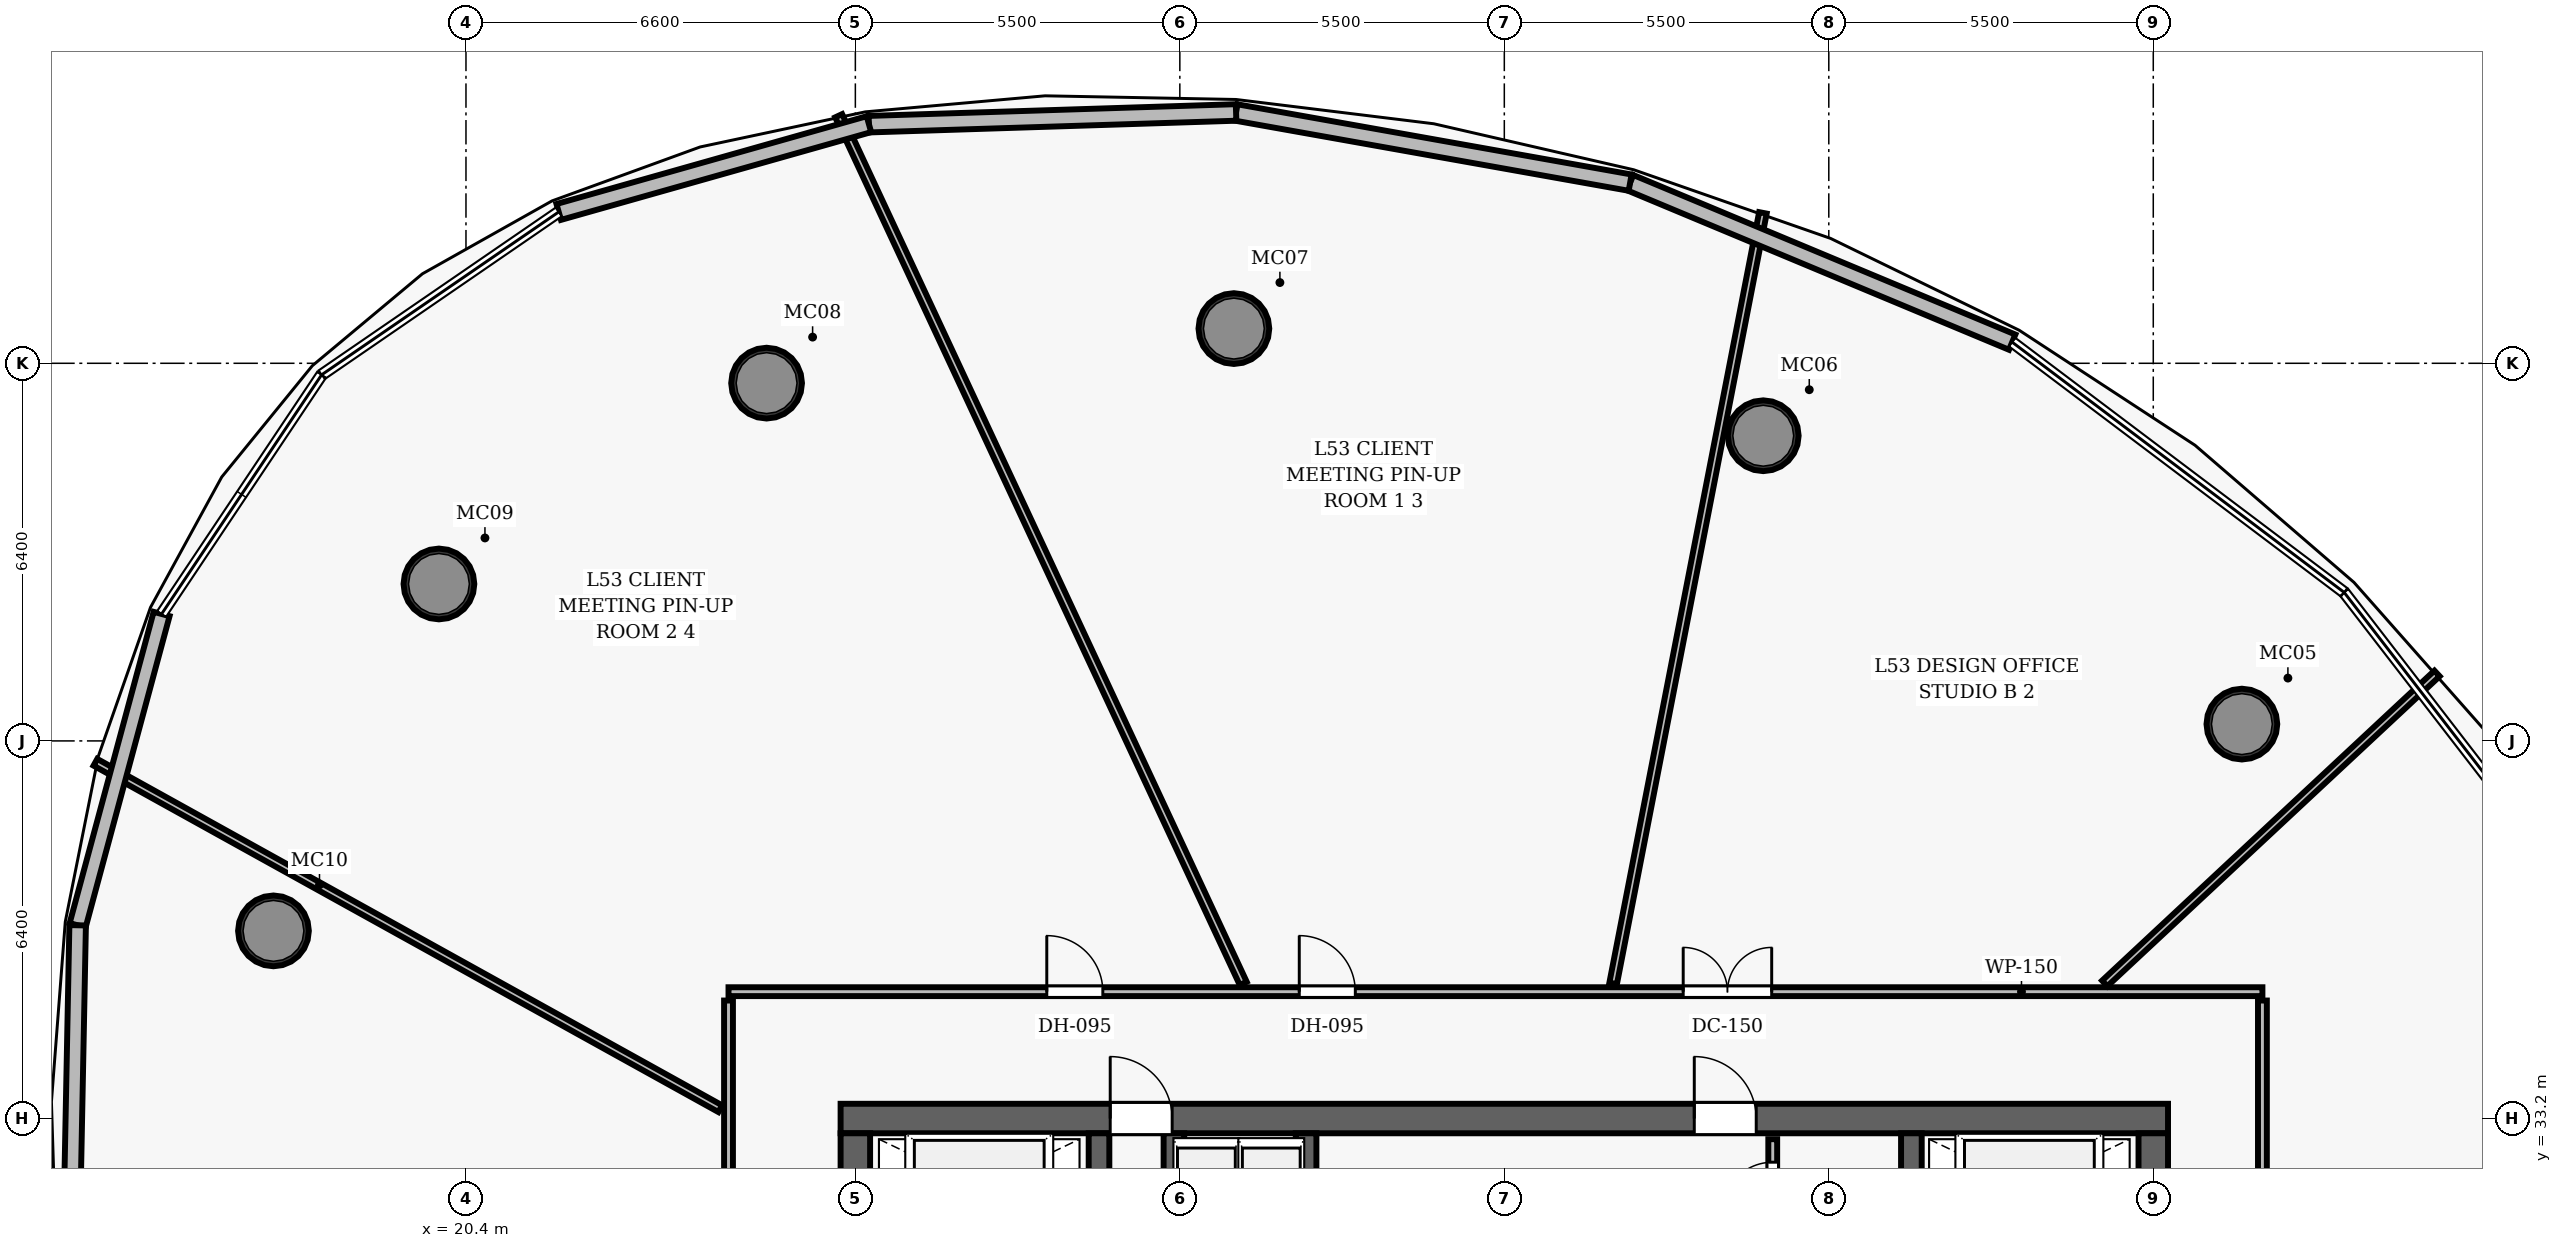
"""IFC4 building model, lengths in metres.
Left out: names, types, materials, properties, quantities, classifications, styles, units other than length and angle.
Written with IfcOpenShell. Run it as: python <this file> out.ifc"""

import sys

from ifc_helpers import new_model, si_unit, direction, frame, frame_2d, origin, origin_2d, place, context, subcontext, project, spatial, rectangle, hollow_circle, extrude, element, fill, save


model = new_model("IFC4")
c1 = context("Model", 3, precision=1e-05, world=origin(), true_north=direction((0.0, 1.0)))
c2 = subcontext(c1, "Body", "Model", "MODEL_VIEW")
j1 = project(units=[si_unit("LENGTHUNIT", "METRE"), si_unit("PLANEANGLEUNIT", "RADIAN")], contexts=[c1])
p1 = place(None, origin())
s1 = spatial("IfcSite", under=j1, at=p1, CompositionType="ELEMENT")
p2 = place(p1, origin())
s2 = spatial("IfcBuilding", under=s1, at=p2, CompositionType="ELEMENT")
p3 = place(p2, frame((0.0, 0.0, 209.7)))
s3 = spatial("IfcBuildingStorey", under=s2, at=p3, CompositionType="ELEMENT", Elevation=209.7)
p4 = place(p3, frame((26.75, 33.2, 0.0), z_axis=(0.0, 0.0, 1.0), x_axis=(1.0, 0.0, 0.0)))
e1 = element("IfcWall", 1, at=p4, inside=s3, PredefinedType="SHEAR", context=c2, shape_type="SweptSolid", body=[
    extrude(rectangle(XDim=22.5, YDim=0.5, at=frame_2d((11.25, 0.0))), origin(), (0.0, 0.0, 1.0), 3.85),
])
p5 = place(p4, frame((4.57, 0.0, 0.0)))
e2 = element("IfcOpeningElement", 2, at=p5, cuts=e1, PredefinedType="OPENING", context=c2, shape_type="SweptSolid", body=[
    extrude(rectangle(XDim=1.05, YDim=2.15, at=frame_2d((0.525, 1.075))), frame((0.0, 0.26, 0.0), z_axis=(0.0, -1.0, 0.0), x_axis=(1.0, 0.0, 0.0)), (0.0, 0.0, 1.0), 0.52),
])
p6 = place(p4, frame((14.47, 0.0, 0.0)))
e3 = element("IfcOpeningElement", 3, at=p6, cuts=e1, PredefinedType="OPENING", context=c2, shape_type="SweptSolid", body=[
    extrude(rectangle(XDim=1.05, YDim=2.15, at=frame_2d((0.525, 1.075))), frame((0.0, 0.26, 0.0), z_axis=(0.0, -1.0, 0.0), x_axis=(1.0, 0.0, 0.0)), (0.0, 0.0, 1.0), 0.52),
])
p7 = place(p3, frame((27.0, 19.05, 0.0), z_axis=(0.0, 0.0, 1.0), x_axis=(0.0, 1.0, 0.0)))
e4 = element("IfcWall", 4, at=p7, inside=s3, PredefinedType="SHEAR", context=c2, shape_type="SweptSolid", body=[
    extrude(rectangle(XDim=13.9, YDim=0.5, at=frame_2d((6.95, 0.0))), origin(), (0.0, 0.0, 1.0), 3.85),
])
p8 = place(p7, frame((8.2, 0.0, 0.0)))
e5 = element("IfcOpeningElement", 5, at=p8, cuts=e4, PredefinedType="OPENING", context=c2, shape_type="SweptSolid", body=[
    extrude(rectangle(XDim=1.05, YDim=2.15, at=frame_2d((0.525, 1.075))), frame((0.0, 0.26, 0.0), z_axis=(0.0, -1.0, 0.0), x_axis=(1.0, 0.0, 0.0)), (0.0, 0.0, 1.0), 0.52),
])
p9 = place(p3, frame((49.0, 19.05, 0.0), z_axis=(0.0, 0.0, 1.0), x_axis=(0.0, 1.0, 0.0)))
e6 = element("IfcWall", 6, at=p9, inside=s3, PredefinedType="SHEAR", context=c2, shape_type="SweptSolid", body=[
    extrude(rectangle(XDim=13.9, YDim=0.5, at=frame_2d((6.95, 0.0))), origin(), (0.0, 0.0, 1.0), 3.85),
])
p10 = place(p9, frame((8.2, 0.0, 0.0)))
e7 = element("IfcOpeningElement", 7, at=p10, cuts=e6, PredefinedType="OPENING", context=c2, shape_type="SweptSolid", body=[
    extrude(rectangle(XDim=1.05, YDim=2.15, at=frame_2d((0.525, 1.075))), frame((0.0, 0.26, 0.0), z_axis=(0.0, -1.0, 0.0), x_axis=(1.0, 0.0, 0.0)), (0.0, 0.0, 1.0), 0.52),
])
for number, where, z_axis, x_axis in (
    (8, (31.13, 19.05, 0.0), (0.0, 0.0, 1.0), (0.0, 1.0, 0.0)),
    (9, (44.9, 19.05, 0.0), (0.0, 0.0, 1.0), (0.0, 1.0, 0.0)),
):
    element("IfcWall", number, at=place(p3, frame(where, z_axis=z_axis, x_axis=x_axis)), inside=s3, PredefinedType="SHEAR", context=c2, shape_type="SweptSolid", body=[
        extrude(rectangle(XDim=13.9, YDim=0.35, at=frame_2d((6.95, 0.0))), origin(), (0.0, 0.0, 1.0), 3.85),
    ])
for number, where, z_axis, x_axis in (
    (10, (50.502, 39.885, 0.0), (0.0, 0.0, 1.0), (1.0, 0.0, 0.0)),
    (11, (42.389, 44.772, 0.0), (0.0, 0.0, 1.0), (1.0, 0.0, 0.0)),
    (12, (33.416, 46.588, 0.0), (0.0, 0.0, 1.0), (1.0, 0.0, 0.0)),
    (13, (25.496, 45.664, 0.0), (0.0, 0.0, 1.0), (1.0, 0.0, 0.0)),
    (14, (19.942, 42.26, 0.0), (0.0, 0.0, 1.0), (1.0, 0.0, 0.0)),
    (15, (17.137, 36.381, 0.0), (0.0, 0.0, 1.0), (1.0, 0.0, 0.0)),
):
    element("IfcColumn", number, at=place(p3, frame(where, z_axis=z_axis, x_axis=x_axis)), inside=s3, PredefinedType="COLUMN", context=c2, shape_type="SweptSolid", body=[
        extrude(hollow_circle(Radius=0.6, WallThickness=0.05, at=origin_2d()), origin(), (0.0, 0.0, 1.0), 3.85),
    ])
p11 = place(p3, frame((34.64, 26.69, 0.0), z_axis=(0.0, 0.0, 1.0), x_axis=(0.0, 1.0, 0.0)))
e16 = element("IfcWall", 16, at=p11, inside=s3, PredefinedType="SHEAR", context=c2, shape_type="SweptSolid", body=[
    extrude(rectangle(XDim=6.26, YDim=0.35, at=frame_2d((3.13, 0.0))), origin(), (0.0, 0.0, 1.0), 3.85),
])
p12 = place(p3, frame((32.4, 30.22, 0.0), z_axis=(0.0, 0.0, 1.0), x_axis=(0.0, 1.0, 0.0)))
e17 = element("IfcWall", 17, at=p12, inside=s3, PredefinedType="SHEAR", context=c2, shape_type="SweptSolid", body=[
    extrude(rectangle(XDim=2.73, YDim=0.35, at=frame_2d((1.365, 0.0))), origin(), (0.0, 0.0, 1.0), 3.035),
])
p13 = place(p3, frame((42.55, 28.1, 0.0), z_axis=(0.0, 0.0, 1.0), x_axis=(0.0, 1.0, 0.0)))
e18 = element("IfcWall", 18, at=p13, inside=s3, PredefinedType="PARTITIONING", context=c2, shape_type="SweptSolid", body=[
    extrude(rectangle(XDim=4.75, YDim=0.15, at=frame_2d((2.375, 0.0))), origin(), (0.0, 0.0, 1.0), 3.035),
])
p14 = place(p13, frame((0.35, 0.0, 0.0)))
e19 = element("IfcOpeningElement", 19, at=p14, cuts=e18, PredefinedType="OPENING", context=c2, shape_type="SweptSolid", body=[
    extrude(rectangle(XDim=0.85, YDim=2.1, at=frame_2d((0.425, 1.05))), frame((0.0, 0.085, 0.0), z_axis=(0.0, -1.0, 0.0), x_axis=(1.0, 0.0, 0.0)), (0.0, 0.0, 1.0), 0.17),
])
p15 = place(p13, frame((1.93, 0.0, 0.0)))
e20 = element("IfcOpeningElement", 20, at=p15, cuts=e18, PredefinedType="OPENING", context=c2, shape_type="SweptSolid", body=[
    extrude(rectangle(XDim=0.85, YDim=2.1, at=frame_2d((0.425, 1.05))), frame((0.0, 0.085, 0.0), z_axis=(0.0, -1.0, 0.0), x_axis=(1.0, 0.0, 0.0)), (0.0, 0.0, 1.0), 0.17),
])
p16 = place(p13, frame((3.51, 0.0, 0.0)))
e21 = element("IfcOpeningElement", 21, at=p16, cuts=e18, PredefinedType="OPENING", context=c2, shape_type="SweptSolid", body=[
    extrude(rectangle(XDim=0.85, YDim=2.1, at=frame_2d((0.425, 1.05))), frame((0.0, 0.085, 0.0), z_axis=(0.0, -1.0, 0.0), x_axis=(1.0, 0.0, 0.0)), (0.0, 0.0, 1.0), 0.17),
])
p17 = place(p3, frame((24.85, 35.35, 0.0), z_axis=(0.0, 0.0, 1.0), x_axis=(1.0, 0.0, 0.0)))
e22 = element("IfcWall", 22, at=p17, inside=s3, PredefinedType="PARTITIONING", context=c2, shape_type="SweptSolid", body=[
    extrude(rectangle(XDim=26.0, YDim=0.15, at=frame_2d((13.0, 0.0))), origin(), (0.0, 0.0, 1.0), 3.035),
])
p18 = place(p17, frame((16.182, 0.0, 0.0)))
e23 = element("IfcOpeningElement", 23, at=p18, cuts=e22, PredefinedType="OPENING", context=c2, shape_type="SweptSolid", body=[
    extrude(rectangle(XDim=1.5, YDim=2.2, at=frame_2d((0.75, 1.1))), frame((0.0, 0.085, 0.0), z_axis=(0.0, -1.0, 0.0), x_axis=(1.0, 0.0, 0.0)), (0.0, 0.0, 1.0), 0.17),
])
p19 = place(p17, frame((9.675, 0.0, 0.0)))
e24 = element("IfcOpeningElement", 24, at=p19, cuts=e22, PredefinedType="OPENING", context=c2, shape_type="SweptSolid", body=[
    extrude(rectangle(XDim=0.95, YDim=2.15, at=frame_2d((0.475, 1.075))), frame((0.0, 0.085, 0.0), z_axis=(0.0, -1.0, 0.0), x_axis=(1.0, 0.0, 0.0)), (0.0, 0.0, 1.0), 0.17),
])
p20 = place(p17, frame((5.395, 0.0, 0.0)))
e25 = element("IfcOpeningElement", 25, at=p20, cuts=e22, PredefinedType="OPENING", context=c2, shape_type="SweptSolid", body=[
    extrude(rectangle(XDim=0.95, YDim=2.15, at=frame_2d((0.475, 1.075))), frame((0.0, 0.085, 0.0), z_axis=(0.0, -1.0, 0.0), x_axis=(1.0, 0.0, 0.0)), (0.0, 0.0, 1.0), 0.17),
])
p21 = place(p3, frame((24.85, 27.08, 0.0), z_axis=(0.0, 0.0, 1.0), x_axis=(0.0, 1.0, 0.0)))
e26 = element("IfcWall", 26, at=p21, inside=s3, PredefinedType="PARTITIONING", context=c2, shape_type="SweptSolid", body=[
    extrude(rectangle(XDim=8.12, YDim=0.15, at=frame_2d((4.06, 0.0))), origin(), (0.0, 0.0, 1.0), 3.035),
])
p22 = place(p21, frame((1.169, 0.0, 0.0)))
e27 = element("IfcOpeningElement", 27, at=p22, cuts=e26, PredefinedType="OPENING", context=c2, shape_type="SweptSolid", body=[
    extrude(rectangle(XDim=0.95, YDim=2.15, at=frame_2d((0.475, 1.075))), frame((0.0, 0.085, 0.0), z_axis=(0.0, -1.0, 0.0), x_axis=(1.0, 0.0, 0.0)), (0.0, 0.0, 1.0), 0.17),
])
p23 = place(p3, frame((50.85, 27.08, 0.0), z_axis=(0.0, 0.0, 1.0), x_axis=(0.0, 1.0, 0.0)))
e28 = element("IfcWall", 28, at=p23, inside=s3, PredefinedType="PARTITIONING", context=c2, shape_type="SweptSolid", body=[
    extrude(rectangle(XDim=8.12, YDim=0.15, at=frame_2d((4.06, 0.0))), origin(), (0.0, 0.0, 1.0), 3.035),
])
p24 = place(p23, frame((1.442, 0.0, 0.0)))
e29 = element("IfcOpeningElement", 29, at=p24, cuts=e28, PredefinedType="OPENING", context=c2, shape_type="SweptSolid", body=[
    extrude(rectangle(XDim=1.5, YDim=2.2, at=frame_2d((0.75, 1.1))), frame((0.0, 0.085, 0.0), z_axis=(0.0, -1.0, 0.0), x_axis=(1.0, 0.0, 0.0)), (0.0, 0.0, 1.0), 0.17),
])
p25 = place(p3, frame((48.177, 35.49, 0.0), z_axis=(0.0, 0.0, 1.0), x_axis=(0.731351379183, 0.682000850562, 0.0)))
e30 = element("IfcWall", 30, at=p25, inside=s3, PredefinedType="PARTITIONING", context=c2, shape_type="SweptSolid", body=[
    extrude(rectangle(XDim=7.703, YDim=0.13, at=frame_2d((3.851, 0.0))), origin(), (0.0, 0.0, 1.0), 3.035),
])
p26 = place(p3, frame((39.845, 35.49, 0.0), z_axis=(0.0, 0.0, 1.0), x_axis=(0.190812682299, 0.981626466775, 0.0)))
e31 = element("IfcWall", 31, at=p26, inside=s3, PredefinedType="PARTITIONING", context=c2, shape_type="SweptSolid", body=[
    extrude(rectangle(XDim=13.304, YDim=0.13, at=frame_2d((6.652, 0.0))), origin(), (0.0, 0.0, 1.0), 3.035),
])
p27 = place(p3, frame((33.575, 35.49, 0.0), z_axis=(0.0, 0.0, 1.0), x_axis=(-0.422617745277, 0.906308027868, 0.0)))
e32 = element("IfcWall", 32, at=p27, inside=s3, PredefinedType="PARTITIONING", context=c2, shape_type="SweptSolid", body=[
    extrude(rectangle(XDim=16.226, YDim=0.13, at=frame_2d((8.113, 0.0))), origin(), (0.0, 0.0, 1.0), 3.035),
])
p28 = place(p3, frame((24.71, 33.367, 0.0), z_axis=(0.0, 0.0, 1.0), x_axis=(-0.874611459902, 0.484824498357, 0.0)))
e33 = element("IfcWall", 33, at=p28, inside=s3, PredefinedType="PARTITIONING", context=c2, shape_type="SweptSolid", body=[
    extrude(rectangle(XDim=12.11, YDim=0.13, at=frame_2d((6.055, 0.0))), origin(), (0.0, 0.0, 1.0), 3.035),
])
p29 = place(p3, frame((40.133, 49.062, 0.0), z_axis=(0.0, 0.0, 1.0), x_axis=(0.922805990823, -0.385264978035, 0.0)))
e34 = element("IfcWall", 34, at=p29, inside=s3, PredefinedType="SOLIDWALL", context=c2, shape_type="SweptSolid", body=[
    extrude(rectangle(XDim=7.018, YDim=0.28, at=frame_2d((3.509, 0.0))), origin(), (0.0, 0.0, 1.0), 3.62),
])
p30 = place(p3, frame((33.453, 50.251, 0.0), z_axis=(0.0, 0.0, 1.0), x_axis=(0.98451285937, -0.175312377589, 0.0)))
e35 = element("IfcWall", 35, at=p30, inside=s3, PredefinedType="SOLIDWALL", context=c2, shape_type="SweptSolid", body=[
    extrude(rectangle(XDim=6.785, YDim=0.28, at=frame_2d((3.392, 0.0))), origin(), (0.0, 0.0, 1.0), 3.62),
])
p31 = place(p3, frame((27.23, 50.052, 0.0), z_axis=(0.0, 0.0, 1.0), x_axis=(0.999490496546, 0.031917821271, 0.0)))
e36 = element("IfcWall", 36, at=p31, inside=s3, PredefinedType="SOLIDWALL", context=c2, shape_type="SweptSolid", body=[
    extrude(rectangle(XDim=6.226, YDim=0.28, at=frame_2d((3.113, 0.0))), origin(), (0.0, 0.0, 1.0), 3.62),
])
p32 = place(p3, frame((21.972, 48.565, 0.0), z_axis=(0.0, 0.0, 1.0), x_axis=(0.962233872623, 0.272224125268, 0.0)))
e37 = element("IfcWall", 37, at=p32, inside=s3, PredefinedType="SOLIDWALL", context=c2, shape_type="SweptSolid", body=[
    extrude(rectangle(XDim=5.464, YDim=0.28, at=frame_2d((2.732, 0.0))), origin(), (0.0, 0.0, 1.0), 3.62),
])
p33 = place(p3, frame((13.818, 36.475, 0.0), z_axis=(0.0, 0.0, 1.0), x_axis=(0.260470130189, 0.965481906241, 0.0)))
e38 = element("IfcWall", 38, at=p33, inside=s3, PredefinedType="SOLIDWALL", context=c2, shape_type="SweptSolid", body=[
    extrude(rectangle(XDim=5.465, YDim=0.28, at=frame_2d((2.732, 0.0))), origin(), (0.0, 0.0, 1.0), 3.62),
])
p34 = place(p3, frame((13.695, 30.25, 0.0), z_axis=(0.0, 0.0, 1.0), x_axis=(0.019683232509, 0.999806266413, 0.0)))
e39 = element("IfcWall", 39, at=p34, inside=s3, PredefinedType="SOLIDWALL", context=c2, shape_type="SweptSolid", body=[
    extrude(rectangle(XDim=6.227, YDim=0.28, at=frame_2d((3.113, 0.0))), origin(), (0.0, 0.0, 1.0), 3.62),
])
p35 = place(p5, origin())
e40 = element("IfcDoor", 40, at=p35, inside=s3, OperationType="SINGLE_SWING_LEFT", PredefinedType="DOOR", context=c2, shape_type="SweptSolid", body=[
    extrude(rectangle(XDim=1.05, YDim=2.15, at=frame_2d((0.525, 1.075))), frame((0.0, 0.025, 0.0), z_axis=(0.0, -1.0, 0.0), x_axis=(1.0, 0.0, 0.0)), (0.0, 0.0, 1.0), 0.05),
])
fill(e2, e40)
p36 = place(p6, origin())
e41 = element("IfcDoor", 41, at=p36, inside=s3, OperationType="SINGLE_SWING_LEFT", PredefinedType="DOOR", context=c2, shape_type="SweptSolid", body=[
    extrude(rectangle(XDim=1.05, YDim=2.15, at=frame_2d((0.525, 1.075))), frame((0.0, 0.025, 0.0), z_axis=(0.0, -1.0, 0.0), x_axis=(1.0, 0.0, 0.0)), (0.0, 0.0, 1.0), 0.05),
])
fill(e3, e41)
p37 = place(p16, origin())
e42 = element("IfcDoor", 42, at=p37, inside=s3, OperationType="SINGLE_SWING_LEFT", PredefinedType="DOOR", context=c2, shape_type="SweptSolid", body=[
    extrude(rectangle(XDim=0.85, YDim=2.1, at=frame_2d((0.425, 1.05))), frame((0.0, 0.025, 0.0), z_axis=(0.0, -1.0, 0.0), x_axis=(1.0, 0.0, 0.0)), (0.0, 0.0, 1.0), 0.05),
])
fill(e21, e42)
p38 = place(p18, origin())
e43 = element("IfcDoor", 43, at=p38, inside=s3, OperationType="DOUBLE_DOOR_SINGLE_SWING", PredefinedType="DOOR", context=c2, shape_type="SweptSolid", body=[
    extrude(rectangle(XDim=1.5, YDim=2.2, at=frame_2d((0.75, 1.1))), frame((0.0, 0.025, 0.0), z_axis=(0.0, -1.0, 0.0), x_axis=(1.0, 0.0, 0.0)), (0.0, 0.0, 1.0), 0.05),
])
fill(e23, e43)
p39 = place(p19, origin())
e44 = element("IfcDoor", 44, at=p39, inside=s3, OperationType="SINGLE_SWING_LEFT", PredefinedType="DOOR", context=c2, shape_type="SweptSolid", body=[
    extrude(rectangle(XDim=0.95, YDim=2.15, at=frame_2d((0.475, 1.075))), frame((0.0, 0.025, 0.0), z_axis=(0.0, -1.0, 0.0), x_axis=(1.0, 0.0, 0.0)), (0.0, 0.0, 1.0), 0.05),
])
fill(e24, e44)
p40 = place(p20, origin())
e45 = element("IfcDoor", 45, at=p40, inside=s3, OperationType="SINGLE_SWING_LEFT", PredefinedType="DOOR", context=c2, shape_type="SweptSolid", body=[
    extrude(rectangle(XDim=0.95, YDim=2.15, at=frame_2d((0.475, 1.075))), frame((0.0, 0.025, 0.0), z_axis=(0.0, -1.0, 0.0), x_axis=(1.0, 0.0, 0.0)), (0.0, 0.0, 1.0), 0.05),
])
fill(e25, e45)
save(model, sys.argv[1])
